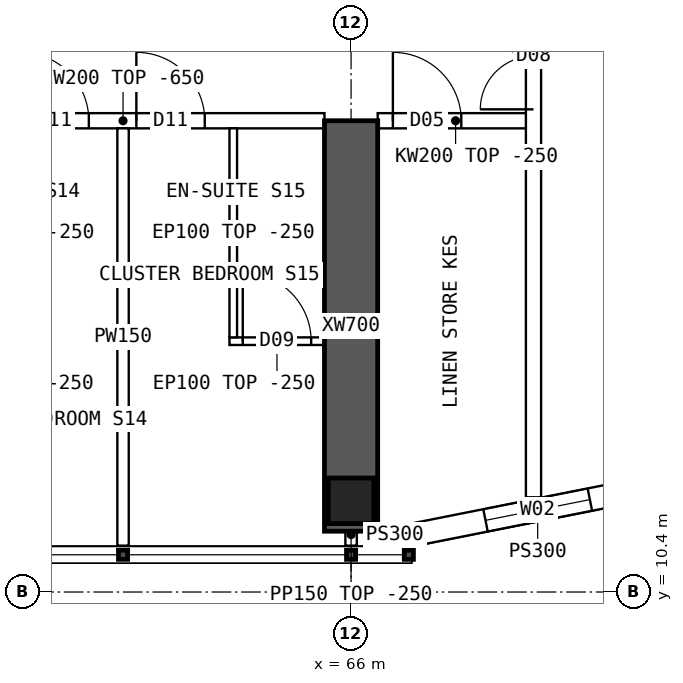
"""IFC4 building model, lengths in metres.
Left out: names, types, materials, properties, quantities, classifications, styles, units other than length and angle.
Written with IfcOpenShell. Run it as: python <this file> out.ifc"""

import sys

from ifc_helpers import new_model, si_unit, direction, frame, frame_2d, origin, origin_2d, place, context, subcontext, project, spatial, polyline, rectangle, hollow_rectangle, outline, extrude, element, fill, save


model = new_model("IFC4")
c1 = context("Model", 3, precision=1e-05, world=origin(), true_north=direction((0.0, 1.0)))
c2 = subcontext(c1, "Body", "Model", "MODEL_VIEW")
j1 = project(units=[si_unit("LENGTHUNIT", "METRE"), si_unit("PLANEANGLEUNIT", "RADIAN")], contexts=[c1])
p1 = place(None, origin())
s1 = spatial("IfcSite", under=j1, at=p1, CompositionType="ELEMENT")
p2 = place(p1, origin())
s2 = spatial("IfcBuilding", under=s1, at=p2, CompositionType="ELEMENT")
p3 = place(p2, frame((0.0, 0.0, 235.3)))
s3 = spatial("IfcBuildingStorey", under=s2, at=p3, CompositionType="ELEMENT", Elevation=235.3)
p4 = place(p3, frame((66.0, 11.6, 0.0), z_axis=(0.0, 0.0, 1.0), x_axis=(1.0, 0.0, 0.0)))
e1 = element("IfcColumn", 1, at=p4, inside=s3, PredefinedType="COLUMN", context=c2, shape_type="SweptSolid", body=[
    extrude(hollow_rectangle(XDim=0.6, YDim=0.6, WallThickness=0.06, at=origin_2d()), origin(), (0.0, 0.0, 1.0), 3.75),
])
p5 = place(p3, frame((66.0, 11.2, 0.0), z_axis=(0.0, 0.0, 1.0), x_axis=(0.0, 1.0, 0.0)))
e2 = element("IfcWall", 2, at=p5, inside=s3, PredefinedType="SHEAR", context=c2, shape_type="SweptSolid", body=[
    extrude(rectangle(XDim=5.4, YDim=0.7, at=frame_2d((2.7, 0.0))), origin(), (0.0, 0.0, 1.0), 3.75),
])
p6 = place(p3, frame((66.8, 11.15, 0.0), z_axis=(0.0, 0.0, 1.0), x_axis=(0.98078325777, 0.195100490205, 0.0)))
e3 = element("IfcWall", 3, at=p6, inside=s3, PredefinedType="SOLIDWALL", context=c2, shape_type="SweptSolid", body=[
    extrude(outline(polyline([(-0.03, -0.15), (3.405, -0.15), (3.345, 0.15), (0.03, 0.15), (-0.03, -0.15)])), origin(), (0.0, 0.0, 1.0), 3.5),
])
p7 = place(p6, frame((0.988, 0.0, 0.9)))
e4 = element("IfcOpeningElement", 4, at=p7, cuts=e3, PredefinedType="OPENING", context=c2, shape_type="SweptSolid", body=[
    extrude(rectangle(XDim=1.4, YDim=1.8, at=frame_2d((0.7, 0.9))), frame((0.0, 0.16, 0.0), z_axis=(0.0, -1.0, 0.0), x_axis=(1.0, 0.0, 0.0)), (0.0, 0.0, 1.0), 0.32),
])
p8 = place(p3, frame((66.8, 11.15, 0.0), z_axis=(0.0, 0.0, 1.0), x_axis=(-1.0, 0.0, 0.0)))
e5 = element("IfcWall", 5, at=p8, inside=s3, PredefinedType="SOLIDWALL", context=c2, shape_type="SweptSolid", body=[
    extrude(rectangle(XDim=0.45, YDim=0.3, at=frame_2d((0.225, 0.0))), origin(), (0.0, 0.0, 1.0), 3.5),
])
p9 = place(p3, frame((60.35, 16.6, 0.0), z_axis=(0.0, 0.0, 1.0), x_axis=(1.0, 0.0, 0.0)))
e6 = element("IfcWall", 6, at=p9, inside=s3, PredefinedType="SOLIDWALL", context=c2, shape_type="SweptSolid", body=[
    extrude(outline(polyline([(0.0, 0.0), (5.3, 0.0), (5.3, 3.1), (0.0, 3.1), (0.0, 0.0)])), frame((0.0, 0.1, 0.0), z_axis=(0.0, -1.0, 0.0), x_axis=(1.0, 0.0, 0.0)), (0.0, 0.0, 1.0), 0.2),
])
p10 = place(p9, frame((1.3, 0.0, 0.0)))
e7 = element("IfcOpeningElement", 7, at=p10, cuts=e6, PredefinedType="OPENING", context=c2, shape_type="SweptSolid", body=[
    extrude(rectangle(XDim=0.9, YDim=2.1, at=frame_2d((0.45, 1.05))), frame((0.0, 0.11, 0.0), z_axis=(0.0, -1.0, 0.0), x_axis=(1.0, 0.0, 0.0)), (0.0, 0.0, 1.0), 0.22),
])
p11 = place(p9, frame((2.825, 0.0, 0.0)))
e8 = element("IfcOpeningElement", 8, at=p11, cuts=e6, PredefinedType="OPENING", context=c2, shape_type="SweptSolid", body=[
    extrude(rectangle(XDim=0.9, YDim=2.1, at=frame_2d((0.45, 1.05))), frame((0.0, 0.11, 0.0), z_axis=(0.0, -1.0, 0.0), x_axis=(1.0, 0.0, 0.0)), (0.0, 0.0, 1.0), 0.22),
])
p12 = place(p3, frame((66.35, 16.6, 0.0), z_axis=(0.0, 0.0, 1.0), x_axis=(1.0, 0.0, 0.0)))
e9 = element("IfcWall", 9, at=p12, inside=s3, PredefinedType="SOLIDWALL", context=c2, shape_type="SweptSolid", body=[
    extrude(rectangle(XDim=2.05, YDim=0.2, at=frame_2d((1.025, 0.0))), origin(), (0.0, 0.0, 1.0), 3.5),
])
p13 = place(p12, frame((0.2, 0.0, 0.0)))
e10 = element("IfcOpeningElement", 10, at=p13, cuts=e9, PredefinedType="OPENING", context=c2, shape_type="SweptSolid", body=[
    extrude(rectangle(XDim=0.9, YDim=2.1, at=frame_2d((0.45, 1.05))), frame((0.0, 0.11, 0.0), z_axis=(0.0, -1.0, 0.0), x_axis=(1.0, 0.0, 0.0)), (0.0, 0.0, 1.0), 0.22),
])
p14 = place(p3, frame((63.0, 11.01, 0.0), z_axis=(0.0, 0.0, 1.0), x_axis=(0.0, 1.0, 0.0)))
e11 = element("IfcWall", 11, at=p14, inside=s3, PredefinedType="PARTITIONING", context=c2, shape_type="SweptSolid", body=[
    extrude(outline(polyline([(0.0, 0.0), (5.49, 0.0), (5.49, 3.1), (5.442, 3.1), (5.44, 3.5), (0.792, 3.5), (0.79, 3.1), (0.392, 3.1), (0.39, 3.5), (0.0, 3.5), (0.0, 0.0)])), frame((0.0, 0.075, 0.0), z_axis=(0.0, -1.0, 0.0), x_axis=(1.0, 0.0, 0.0)), (0.0, 0.0, 1.0), 0.15),
])
p15 = place(p3, frame((65.65, 13.7, 0.0), z_axis=(0.0, 0.0, 1.0), x_axis=(-1.0, 0.0, 0.0)))
e12 = element("IfcWall", 12, at=p15, inside=s3, PredefinedType="PARTITIONING", context=c2, shape_type="SweptSolid", body=[
    extrude(rectangle(XDim=1.25, YDim=0.1, at=frame_2d((0.625, 0.0))), origin(), (0.0, 0.0, 1.0), 3.5),
])
p16 = place(p15, frame((0.175, 0.0, 0.0)))
e13 = element("IfcOpeningElement", 13, at=p16, cuts=e12, PredefinedType="OPENING", context=c2, shape_type="SweptSolid", body=[
    extrude(rectangle(XDim=0.9, YDim=2.1, at=frame_2d((0.45, 1.05))), frame((0.0, 0.06, 0.0), z_axis=(0.0, -1.0, 0.0), x_axis=(1.0, 0.0, 0.0)), (0.0, 0.0, 1.0), 0.12),
])
p17 = place(p3, frame((64.45, 13.75, 0.0), z_axis=(0.0, 0.0, 1.0), x_axis=(0.0, 1.0, 0.0)))
e14 = element("IfcWall", 14, at=p17, inside=s3, PredefinedType="PARTITIONING", context=c2, shape_type="SweptSolid", body=[
    extrude(outline(polyline([(0.0, 0.0), (2.75, 0.0), (2.75, 3.1), (2.702, 3.1), (2.7, 3.5), (0.0, 3.5), (0.0, 0.0)])), frame((0.0, 0.05, 0.0), z_axis=(0.0, -1.0, 0.0), x_axis=(1.0, 0.0, 0.0)), (0.0, 0.0, 1.0), 0.1),
])
p18 = place(p3, frame((68.4, 11.646, 0.0), z_axis=(0.0, 0.0, 1.0), x_axis=(0.0, 1.0, 0.0)))
e15 = element("IfcWall", 15, at=p18, inside=s3, PredefinedType="SOLIDWALL", context=c2, shape_type="SweptSolid", body=[
    extrude(rectangle(XDim=40.708, YDim=0.2, at=frame_2d((20.354, 0.0))), origin(), (0.0, 0.0, 1.0), 3.5),
])
p19 = place(p18, frame((5.104, 0.0, 0.0)))
e16 = element("IfcOpeningElement", 16, at=p19, cuts=e15, PredefinedType="OPENING", context=c2, shape_type="SweptSolid", body=[
    extrude(rectangle(XDim=1.4, YDim=2.1, at=frame_2d((0.7, 1.05))), frame((0.0, 0.11, 0.0), z_axis=(0.0, -1.0, 0.0), x_axis=(1.0, 0.0, 0.0)), (0.0, 0.0, 1.0), 0.22),
])
p20 = place(p18, frame((34.104, 0.0, 0.0)))
e17 = element("IfcOpeningElement", 17, at=p20, cuts=e15, PredefinedType="OPENING", context=c2, shape_type="SweptSolid", body=[
    extrude(rectangle(XDim=1.4, YDim=2.1, at=frame_2d((0.7, 1.05))), frame((0.0, 0.11, 0.0), z_axis=(0.0, -1.0, 0.0), x_axis=(1.0, 0.0, 0.0)), (0.0, 0.0, 1.0), 0.22),
])
p21 = place(p3, frame((66.0, 11.3, 0.0), z_axis=(0.0, 0.0, 1.0), x_axis=(0.0, -1.0, 0.0)))
e18 = element("IfcWall", 18, at=p21, inside=s3, PredefinedType="PARTITIONING", context=c2, shape_type="SweptSolid", body=[
    extrude(rectangle(XDim=0.29, YDim=0.15, at=frame_2d((0.145, 0.0))), origin(), (0.0, 0.0, 1.0), 3.5),
])
p22 = place(p7, origin())
e19 = element("IfcWindow", 19, at=p22, inside=s3, PartitioningType="SINGLE_PANEL", PredefinedType="WINDOW", context=c2, shape_type="SweptSolid", body=[
    extrude(rectangle(XDim=1.4, YDim=1.8, at=frame_2d((0.7, 0.9))), frame((0.0, 0.03, 0.0), z_axis=(0.0, -1.0, 0.0), x_axis=(1.0, 0.0, 0.0)), (0.0, 0.0, 1.0), 0.06),
])
fill(e4, e19)
p23 = place(p10, origin())
e20 = element("IfcDoor", 20, at=p23, inside=s3, OperationType="SINGLE_SWING_LEFT", PredefinedType="DOOR", context=c2, shape_type="SweptSolid", body=[
    extrude(rectangle(XDim=0.9, YDim=2.1, at=frame_2d((0.45, 1.05))), frame((0.0, 0.025, 0.0), z_axis=(0.0, -1.0, 0.0), x_axis=(1.0, 0.0, 0.0)), (0.0, 0.0, 1.0), 0.05),
])
fill(e7, e20)
p24 = place(p16, origin())
e21 = element("IfcDoor", 21, at=p24, inside=s3, OperationType="SINGLE_SWING_RIGHT", PredefinedType="DOOR", context=c2, shape_type="SweptSolid", body=[
    extrude(rectangle(XDim=0.9, YDim=2.1, at=frame_2d((0.45, 1.05))), frame((0.0, 0.025, 0.0), z_axis=(0.0, -1.0, 0.0), x_axis=(1.0, 0.0, 0.0)), (0.0, 0.0, 1.0), 0.05),
])
fill(e13, e21)
p25 = place(p11, origin())
e22 = element("IfcDoor", 22, at=p25, inside=s3, OperationType="SINGLE_SWING_LEFT", PredefinedType="DOOR", context=c2, shape_type="SweptSolid", body=[
    extrude(rectangle(XDim=0.9, YDim=2.1, at=frame_2d((0.45, 1.05))), frame((0.0, 0.025, 0.0), z_axis=(0.0, -1.0, 0.0), x_axis=(1.0, 0.0, 0.0)), (0.0, 0.0, 1.0), 0.05),
])
fill(e8, e22)
p26 = place(p19, origin())
e23 = element("IfcDoor", 23, at=p26, inside=s3, OperationType="DOUBLE_DOOR_SINGLE_SWING", PredefinedType="DOOR", context=c2, shape_type="SweptSolid", body=[
    extrude(rectangle(XDim=1.4, YDim=2.1, at=frame_2d((0.7, 1.05))), frame((0.0, 0.025, 0.0), z_axis=(0.0, -1.0, 0.0), x_axis=(1.0, 0.0, 0.0)), (0.0, 0.0, 1.0), 0.05),
])
fill(e16, e23)
p27 = place(p13, origin())
e24 = element("IfcDoor", 24, at=p27, inside=s3, OperationType="SINGLE_SWING_LEFT", PredefinedType="DOOR", context=c2, shape_type="SweptSolid", body=[
    extrude(rectangle(XDim=0.9, YDim=2.1, at=frame_2d((0.45, 1.05))), frame((0.0, 0.025, 0.0), z_axis=(0.0, -1.0, 0.0), x_axis=(1.0, 0.0, 0.0)), (0.0, 0.0, 1.0), 0.05),
])
fill(e10, e24)
save(model, sys.argv[1])
